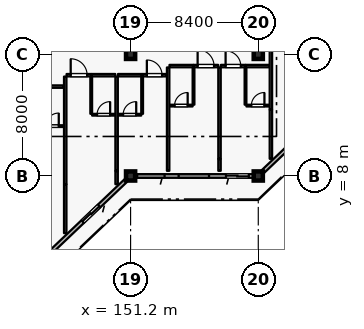
"""IFC4 building model, lengths in metres.
Left out: names, types, materials, properties, quantities, classifications, styles, units other than length and angle.
Written with IfcOpenShell. Run it as: python <this file> out.ifc"""

import sys

from ifc_helpers import new_model, si_unit, direction, frame, frame_2d, origin, origin_2d, place, context, subcontext, project, spatial, rectangle, extrude, element, fill, save


model = new_model("IFC4")
c1 = context("Model", 3, precision=1e-05, world=origin(), true_north=direction((0.0, 1.0)))
c2 = subcontext(c1, "Body", "Model", "MODEL_VIEW")
j1 = project(units=[si_unit("LENGTHUNIT", "METRE"), si_unit("PLANEANGLEUNIT", "RADIAN")], contexts=[c1])
p1 = place(None, origin())
s1 = spatial("IfcSite", under=j1, at=p1, CompositionType="ELEMENT")
p2 = place(p1, origin())
s2 = spatial("IfcBuilding", under=s1, at=p2, CompositionType="ELEMENT")
p3 = place(p2, frame((0.0, 0.0, 43.2)))
s3 = spatial("IfcBuildingStorey", under=s2, at=p3, CompositionType="ELEMENT", Elevation=43.2)
for number, where, z_axis, x_axis in (
    (1, (151.2, 8.0, 0.0), (0.0, 0.0, 1.0), (1.0, 0.0, 0.0)),
    (2, (159.6, 8.0, 0.0), (0.0, 0.0, 1.0), (1.0, 0.0, 0.0)),
    (3, (151.2, 16.0, 0.0), (0.0, 0.0, 1.0), (1.0, 0.0, 0.0)),
    (4, (159.6, 16.0, 0.0), (0.0, 0.0, 1.0), (1.0, 0.0, 0.0)),
):
    element("IfcColumn", number, at=place(p3, frame(where, z_axis=z_axis, x_axis=x_axis)), inside=s3, PredefinedType="COLUMN", context=c2, shape_type="SweptSolid", body=[
        extrude(rectangle(XDim=0.6, YDim=0.6, at=origin_2d()), origin(), (0.0, 0.0, 1.0), 4.2),
    ])
p4 = place(p3, frame((150.9, 7.714, 0.0), z_axis=(0.0, 0.0, 1.0), x_axis=(-0.724145477467, -0.689647248573, 0.0)))
e5 = element("IfcWall", 5, at=p4, inside=s3, PredefinedType="SOLIDWALL", context=c2, shape_type="SweptSolid", body=[
    extrude(rectangle(XDim=10.771, YDim=0.24, at=frame_2d((5.385, 0.0))), origin(), (0.0, 0.0, 1.0), 3.54),
])
p5 = place(p4, frame((2.44, 0.0, 0.0)))
e6 = element("IfcOpeningElement", 6, at=p5, cuts=e5, PredefinedType="OPENING", context=c2, shape_type="SweptSolid", body=[
    extrude(rectangle(XDim=1.5, YDim=2.25, at=frame_2d((0.75, 1.125))), frame((0.0, 0.13, 0.0), z_axis=(0.0, -1.0, 0.0), x_axis=(1.0, 0.0, 0.0)), (0.0, 0.0, 1.0), 0.26),
])
p6 = place(p4, frame((6.857, 0.0, 0.8)))
e7 = element("IfcOpeningElement", 7, at=p6, cuts=e5, PredefinedType="OPENING", context=c2, shape_type="SweptSolid", body=[
    extrude(rectangle(XDim=2.0, YDim=1.75, at=frame_2d((1.0, 0.875))), frame((0.0, 0.13, 0.0), z_axis=(0.0, -1.0, 0.0), x_axis=(1.0, 0.0, 0.0)), (0.0, 0.0, 1.0), 0.26),
])
p7 = place(p3, frame((159.3, 8.0, 0.0), z_axis=(0.0, 0.0, 1.0), x_axis=(-1.0, 0.0, 0.0)))
e8 = element("IfcWall", 8, at=p7, inside=s3, PredefinedType="SOLIDWALL", context=c2, shape_type="SweptSolid", body=[
    extrude(rectangle(XDim=7.8, YDim=0.24, at=frame_2d((3.9, 0.0))), origin(), (0.0, 0.0, 1.0), 3.49),
])
p8 = place(p7, frame((0.325, 0.0, 0.0)))
e9 = element("IfcOpeningElement", 9, at=p8, cuts=e8, PredefinedType="OPENING", context=c2, shape_type="SweptSolid", body=[
    extrude(rectangle(XDim=1.5, YDim=2.25, at=frame_2d((0.75, 1.125))), frame((0.0, 0.13, 0.0), z_axis=(0.0, -1.0, 0.0), x_axis=(1.0, 0.0, 0.0)), (0.0, 0.0, 1.0), 0.26),
])
p9 = place(p7, frame((2.94, 0.0, 0.8)))
e10 = element("IfcOpeningElement", 10, at=p9, cuts=e8, PredefinedType="OPENING", context=c2, shape_type="SweptSolid", body=[
    extrude(rectangle(XDim=2.0, YDim=1.75, at=frame_2d((1.0, 0.875))), frame((0.0, 0.13, 0.0), z_axis=(0.0, -1.0, 0.0), x_axis=(1.0, 0.0, 0.0)), (0.0, 0.0, 1.0), 0.26),
])
p10 = place(p7, frame((5.865, 0.0, 0.8)))
e11 = element("IfcOpeningElement", 11, at=p10, cuts=e8, PredefinedType="OPENING", context=c2, shape_type="SweptSolid", body=[
    extrude(rectangle(XDim=1.8, YDim=1.7, at=frame_2d((0.9, 0.85))), frame((0.0, 0.13, 0.0), z_axis=(0.0, -1.0, 0.0), x_axis=(1.0, 0.0, 0.0)), (0.0, 0.0, 1.0), 0.26),
])
p11 = place(p3, frame((167.7, 15.714, 0.0), z_axis=(0.0, 0.0, 1.0), x_axis=(-0.724156257633, -0.689635928973, 0.0)))
e12 = element("IfcWall", 12, at=p11, inside=s3, PredefinedType="SOLIDWALL", context=c2, shape_type="SweptSolid", body=[
    extrude(rectangle(XDim=10.771, YDim=0.24, at=frame_2d((5.386, 0.0))), origin(), (0.0, 0.0, 1.0), 3.49),
])
p12 = place(p11, frame((2.274, 0.0, 0.0)))
e13 = element("IfcOpeningElement", 13, at=p12, cuts=e12, PredefinedType="OPENING", context=c2, shape_type="SweptSolid", body=[
    extrude(rectangle(XDim=1.5, YDim=2.25, at=frame_2d((0.75, 1.125))), frame((0.0, 0.13, 0.0), z_axis=(0.0, -1.0, 0.0), x_axis=(1.0, 0.0, 0.0)), (0.0, 0.0, 1.0), 0.26),
])
p13 = place(p11, frame((6.699, 0.0, 0.8)))
e14 = element("IfcOpeningElement", 14, at=p13, cuts=e12, PredefinedType="OPENING", context=c2, shape_type="SweptSolid", body=[
    extrude(rectangle(XDim=2.0, YDim=1.75, at=frame_2d((1.0, 0.875))), frame((0.0, 0.13, 0.0), z_axis=(0.0, -1.0, 0.0), x_axis=(1.0, 0.0, 0.0)), (0.0, 0.0, 1.0), 0.26),
])
p14 = place(p3, frame((145.24, 13.88, 0.0), z_axis=(0.0, 0.0, 1.0), x_axis=(1.0, 0.0, 0.0)))
e15 = element("IfcWall", 15, at=p14, inside=s3, PredefinedType="PARTITIONING", context=c2, shape_type="SweptSolid", body=[
    extrude(rectangle(XDim=1.57, YDim=0.16, at=frame_2d((0.785, 0.0))), origin(), (0.0, 0.0, 1.0), 3.935),
])
p15 = place(p3, frame((145.29, 11.28, 0.0), z_axis=(0.0, 0.0, 1.0), x_axis=(1.0, 0.0, 0.0)))
e16 = element("IfcWall", 16, at=p15, inside=s3, PredefinedType="PARTITIONING", context=c2, shape_type="SweptSolid", body=[
    extrude(rectangle(XDim=1.51, YDim=0.115, at=frame_2d((0.755, 0.0))), origin(), (0.0, 0.0, 1.0), 3.935),
])
p16 = place(p15, frame((0.325, 0.0, 0.0)))
e17 = element("IfcOpeningElement", 17, at=p16, cuts=e16, PredefinedType="OPENING", context=c2, shape_type="SweptSolid", body=[
    extrude(rectangle(XDim=0.86, YDim=2.12, at=frame_2d((0.43, 1.06))), frame((0.0, 0.067, 0.0), z_axis=(0.0, -1.0, 0.0), x_axis=(1.0, 0.0, 0.0)), (0.0, 0.0, 1.0), 0.135),
])
p17 = place(p3, frame((146.9, 4.24, 0.0), z_axis=(0.0, 0.0, 1.0), x_axis=(0.0, 1.0, 0.0)))
e18 = element("IfcWall", 18, at=p17, inside=s3, PredefinedType="PARTITIONING", context=c2, shape_type="SweptSolid", body=[
    extrude(rectangle(XDim=3.21, YDim=0.16, at=frame_2d((1.605, 0.0))), origin(), (0.0, 0.0, 1.0), 3.935),
])
p18 = place(p3, frame((146.99, 14.63, 0.0), z_axis=(0.0, 0.0, 1.0), x_axis=(1.0, 0.0, 0.0)))
e19 = element("IfcWall", 19, at=p18, inside=s3, PredefinedType="PARTITIONING", context=c2, shape_type="SweptSolid", body=[
    extrude(rectangle(XDim=1.62, YDim=0.16, at=frame_2d((0.81, 0.0))), origin(), (0.0, 0.0, 1.0), 3.935),
])
p19 = place(p18, frame((0.27, 0.0, 0.0)))
e20 = element("IfcOpeningElement", 20, at=p19, cuts=e19, PredefinedType="OPENING", context=c2, shape_type="SweptSolid", body=[
    extrude(rectangle(XDim=1.08, YDim=2.3, at=frame_2d((0.54, 1.15))), frame((0.0, 0.09, 0.0), z_axis=(0.0, -1.0, 0.0), x_axis=(1.0, 0.0, 0.0)), (0.0, 0.0, 1.0), 0.18),
])
p20 = place(p3, frame((148.62, 14.63, 0.0), z_axis=(0.0, 0.0, 1.0), x_axis=(1.0, 0.0, 0.0)))
e21 = element("IfcWall", 21, at=p20, inside=s3, PredefinedType="PARTITIONING", context=c2, shape_type="SweptSolid", body=[
    extrude(rectangle(XDim=1.57, YDim=0.16, at=frame_2d((0.785, 0.0))), origin(), (0.0, 0.0, 1.0), 3.935),
])
p21 = place(p3, frame((148.61, 12.09, 0.0), z_axis=(0.0, 0.0, 1.0), x_axis=(0.0, 1.0, 0.0)))
e22 = element("IfcWall", 22, at=p21, inside=s3, PredefinedType="PARTITIONING", context=c2, shape_type="SweptSolid", body=[
    extrude(rectangle(XDim=2.45, YDim=0.115, at=frame_2d((1.225, 0.0))), origin(), (0.0, 0.0, 1.0), 3.935),
])
p22 = place(p3, frame((148.67, 12.03, 0.0), z_axis=(0.0, 0.0, 1.0), x_axis=(1.0, 0.0, 0.0)))
e23 = element("IfcWall", 23, at=p22, inside=s3, PredefinedType="PARTITIONING", context=c2, shape_type="SweptSolid", body=[
    extrude(rectangle(XDim=1.51, YDim=0.115, at=frame_2d((0.755, 0.0))), origin(), (0.0, 0.0, 1.0), 3.935),
])
p23 = place(p22, frame((0.325, 0.0, 0.0)))
e24 = element("IfcOpeningElement", 24, at=p23, cuts=e23, PredefinedType="OPENING", context=c2, shape_type="SweptSolid", body=[
    extrude(rectangle(XDim=0.86, YDim=2.12, at=frame_2d((0.43, 1.06))), frame((0.0, 0.067, 0.0), z_axis=(0.0, -1.0, 0.0), x_axis=(1.0, 0.0, 0.0)), (0.0, 0.0, 1.0), 0.135),
])
p24 = place(p3, frame((146.9, 7.46, 0.0), z_axis=(0.0, 0.0, 1.0), x_axis=(0.0, 1.0, 0.0)))
e25 = element("IfcWall", 25, at=p24, inside=s3, PredefinedType="PARTITIONING", context=c2, shape_type="SweptSolid", body=[
    extrude(rectangle(XDim=7.08, YDim=0.16, at=frame_2d((3.54, 0.0))), origin(), (0.0, 0.0, 1.0), 3.935),
])
p25 = place(p3, frame((150.28, 7.46, 0.0), z_axis=(0.0, 0.0, 1.0), x_axis=(0.0, 1.0, 0.0)))
e26 = element("IfcWall", 26, at=p25, inside=s3, PredefinedType="PARTITIONING", context=c2, shape_type="SweptSolid", body=[
    extrude(rectangle(XDim=0.87, YDim=0.16, at=frame_2d((0.435, 0.0))), origin(), (0.0, 0.0, 1.0), 3.935),
])
p26 = place(p3, frame((150.37, 14.63, 0.0), z_axis=(0.0, 0.0, 1.0), x_axis=(1.0, 0.0, 0.0)))
e27 = element("IfcWall", 27, at=p26, inside=s3, PredefinedType="PARTITIONING", context=c2, shape_type="SweptSolid", body=[
    extrude(rectangle(XDim=1.58, YDim=0.16, at=frame_2d((0.79, 0.0))), origin(), (0.0, 0.0, 1.0), 3.935),
])
p27 = place(p3, frame((151.96, 14.63, 0.0), z_axis=(0.0, 0.0, 1.0), x_axis=(1.0, 0.0, 0.0)))
e28 = element("IfcWall", 28, at=p27, inside=s3, PredefinedType="PARTITIONING", context=c2, shape_type="SweptSolid", body=[
    extrude(rectangle(XDim=1.62, YDim=0.16, at=frame_2d((0.81, 0.0))), origin(), (0.0, 0.0, 1.0), 3.935),
])
p28 = place(p27, frame((0.31, 0.0, 0.0)))
e29 = element("IfcOpeningElement", 29, at=p28, cuts=e28, PredefinedType="OPENING", context=c2, shape_type="SweptSolid", body=[
    extrude(rectangle(XDim=1.0, YDim=2.25, at=frame_2d((0.5, 1.125))), frame((0.0, 0.09, 0.0), z_axis=(0.0, -1.0, 0.0), x_axis=(1.0, 0.0, 0.0)), (0.0, 0.0, 1.0), 0.18),
])
p29 = place(p3, frame((151.96, 12.09, 0.0), z_axis=(0.0, 0.0, 1.0), x_axis=(0.0, 1.0, 0.0)))
e30 = element("IfcWall", 30, at=p29, inside=s3, PredefinedType="PARTITIONING", context=c2, shape_type="SweptSolid", body=[
    extrude(rectangle(XDim=2.45, YDim=0.115, at=frame_2d((1.225, 0.0))), origin(), (0.0, 0.0, 1.0), 3.935),
])
p30 = place(p3, frame((150.38, 12.03, 0.0), z_axis=(0.0, 0.0, 1.0), x_axis=(1.0, 0.0, 0.0)))
e31 = element("IfcWall", 31, at=p30, inside=s3, PredefinedType="PARTITIONING", context=c2, shape_type="SweptSolid", body=[
    extrude(rectangle(XDim=1.52, YDim=0.115, at=frame_2d((0.76, 0.0))), origin(), (0.0, 0.0, 1.0), 3.935),
])
p31 = place(p30, frame((0.33, 0.0, 0.0)))
e32 = element("IfcOpeningElement", 32, at=p31, cuts=e31, PredefinedType="OPENING", context=c2, shape_type="SweptSolid", body=[
    extrude(rectangle(XDim=0.86, YDim=2.12, at=frame_2d((0.43, 1.06))), frame((0.0, 0.067, 0.0), z_axis=(0.0, -1.0, 0.0), x_axis=(1.0, 0.0, 0.0)), (0.0, 0.0, 1.0), 0.135),
])
p32 = place(p3, frame((150.28, 8.34, 0.0), z_axis=(0.0, 0.0, 1.0), x_axis=(0.0, 1.0, 0.0)))
e33 = element("IfcWall", 33, at=p32, inside=s3, PredefinedType="PARTITIONING", context=c2, shape_type="SweptSolid", body=[
    extrude(rectangle(XDim=6.2, YDim=0.16, at=frame_2d((3.1, 0.0))), origin(), (0.0, 0.0, 1.0), 3.935),
])
p33 = place(p3, frame((153.76, 15.23, 0.0), z_axis=(0.0, 0.0, 1.0), x_axis=(1.0, 0.0, 0.0)))
e34 = element("IfcWall", 34, at=p33, inside=s3, PredefinedType="PARTITIONING", context=c2, shape_type="SweptSolid", body=[
    extrude(rectangle(XDim=1.57, YDim=0.16, at=frame_2d((0.785, 0.0))), origin(), (0.0, 0.0, 1.0), 3.935),
])
p34 = place(p3, frame((155.34, 15.23, 0.0), z_axis=(0.0, 0.0, 1.0), x_axis=(1.0, 0.0, 0.0)))
e35 = element("IfcWall", 35, at=p34, inside=s3, PredefinedType="PARTITIONING", context=c2, shape_type="SweptSolid", body=[
    extrude(rectangle(XDim=1.62, YDim=0.16, at=frame_2d((0.81, 0.0))), origin(), (0.0, 0.0, 1.0), 3.935),
])
p35 = place(p34, frame((0.27, 0.0, 0.0)))
e36 = element("IfcOpeningElement", 36, at=p35, cuts=e35, PredefinedType="OPENING", context=c2, shape_type="SweptSolid", body=[
    extrude(rectangle(XDim=1.08, YDim=2.3, at=frame_2d((0.54, 1.15))), frame((0.0, 0.09, 0.0), z_axis=(0.0, -1.0, 0.0), x_axis=(1.0, 0.0, 0.0)), (0.0, 0.0, 1.0), 0.18),
])
p36 = place(p3, frame((155.34, 12.69, 0.0), z_axis=(0.0, 0.0, 1.0), x_axis=(0.0, 1.0, 0.0)))
e37 = element("IfcWall", 37, at=p36, inside=s3, PredefinedType="PARTITIONING", context=c2, shape_type="SweptSolid", body=[
    extrude(rectangle(XDim=2.45, YDim=0.115, at=frame_2d((1.225, 0.0))), origin(), (0.0, 0.0, 1.0), 3.935),
])
p37 = place(p3, frame((153.77, 12.63, 0.0), z_axis=(0.0, 0.0, 1.0), x_axis=(1.0, 0.0, 0.0)))
e38 = element("IfcWall", 38, at=p37, inside=s3, PredefinedType="PARTITIONING", context=c2, shape_type="SweptSolid", body=[
    extrude(rectangle(XDim=1.51, YDim=0.115, at=frame_2d((0.755, 0.0))), origin(), (0.0, 0.0, 1.0), 3.935),
])
p38 = place(p37, frame((0.325, 0.0, 0.0)))
e39 = element("IfcOpeningElement", 39, at=p38, cuts=e38, PredefinedType="OPENING", context=c2, shape_type="SweptSolid", body=[
    extrude(rectangle(XDim=0.86, YDim=2.12, at=frame_2d((0.43, 1.06))), frame((0.0, 0.067, 0.0), z_axis=(0.0, -1.0, 0.0), x_axis=(1.0, 0.0, 0.0)), (0.0, 0.0, 1.0), 0.135),
])
p39 = place(p3, frame((153.67, 8.34, 0.0), z_axis=(0.0, 0.0, 1.0), x_axis=(0.0, 1.0, 0.0)))
e40 = element("IfcWall", 40, at=p39, inside=s3, PredefinedType="PARTITIONING", context=c2, shape_type="SweptSolid", body=[
    extrude(rectangle(XDim=6.8, YDim=0.16, at=frame_2d((3.4, 0.0))), origin(), (0.0, 0.0, 1.0), 3.935),
])
p40 = place(p3, frame((157.05, 8.34, 0.0), z_axis=(0.0, 0.0, 1.0), x_axis=(0.0, 1.0, 0.0)))
e41 = element("IfcWall", 41, at=p40, inside=s3, PredefinedType="PARTITIONING", context=c2, shape_type="SweptSolid", body=[
    extrude(rectangle(XDim=0.78, YDim=0.16, at=frame_2d((0.39, 0.0))), origin(), (0.0, 0.0, 1.0), 3.935),
])
p41 = place(p3, frame((157.14, 15.23, 0.0), z_axis=(0.0, 0.0, 1.0), x_axis=(1.0, 0.0, 0.0)))
e42 = element("IfcWall", 42, at=p41, inside=s3, PredefinedType="PARTITIONING", context=c2, shape_type="SweptSolid", body=[
    extrude(rectangle(XDim=1.62, YDim=0.16, at=frame_2d((0.81, 0.0))), origin(), (0.0, 0.0, 1.0), 3.935),
])
p42 = place(p41, frame((0.31, 0.0, 0.0)))
e43 = element("IfcOpeningElement", 43, at=p42, cuts=e42, PredefinedType="OPENING", context=c2, shape_type="SweptSolid", body=[
    extrude(rectangle(XDim=1.0, YDim=2.25, at=frame_2d((0.5, 1.125))), frame((0.0, 0.09, 0.0), z_axis=(0.0, -1.0, 0.0), x_axis=(1.0, 0.0, 0.0)), (0.0, 0.0, 1.0), 0.18),
])
p43 = place(p3, frame((158.77, 15.23, 0.0), z_axis=(0.0, 0.0, 1.0), x_axis=(1.0, 0.0, 0.0)))
e44 = element("IfcWall", 44, at=p43, inside=s3, PredefinedType="PARTITIONING", context=c2, shape_type="SweptSolid", body=[
    extrude(rectangle(XDim=1.57, YDim=0.16, at=frame_2d((0.785, 0.0))), origin(), (0.0, 0.0, 1.0), 3.935),
])
p44 = place(p3, frame((158.76, 12.69, 0.0), z_axis=(0.0, 0.0, 1.0), x_axis=(0.0, 1.0, 0.0)))
e45 = element("IfcWall", 45, at=p44, inside=s3, PredefinedType="PARTITIONING", context=c2, shape_type="SweptSolid", body=[
    extrude(rectangle(XDim=2.45, YDim=0.115, at=frame_2d((1.225, 0.0))), origin(), (0.0, 0.0, 1.0), 3.935),
])
p45 = place(p3, frame((158.82, 12.63, 0.0), z_axis=(0.0, 0.0, 1.0), x_axis=(1.0, 0.0, 0.0)))
e46 = element("IfcWall", 46, at=p45, inside=s3, PredefinedType="PARTITIONING", context=c2, shape_type="SweptSolid", body=[
    extrude(rectangle(XDim=1.51, YDim=0.115, at=frame_2d((0.755, 0.0))), origin(), (0.0, 0.0, 1.0), 3.935),
])
p46 = place(p45, frame((0.325, 0.0, 0.0)))
e47 = element("IfcOpeningElement", 47, at=p46, cuts=e46, PredefinedType="OPENING", context=c2, shape_type="SweptSolid", body=[
    extrude(rectangle(XDim=0.86, YDim=2.12, at=frame_2d((0.43, 1.06))), frame((0.0, 0.067, 0.0), z_axis=(0.0, -1.0, 0.0), x_axis=(1.0, 0.0, 0.0)), (0.0, 0.0, 1.0), 0.135),
])
p47 = place(p3, frame((157.05, 9.13, 0.0), z_axis=(0.0, 0.0, 1.0), x_axis=(0.0, 1.0, 0.0)))
e48 = element("IfcWall", 48, at=p47, inside=s3, PredefinedType="PARTITIONING", context=c2, shape_type="SweptSolid", body=[
    extrude(rectangle(XDim=6.01, YDim=0.16, at=frame_2d((3.005, 0.0))), origin(), (0.0, 0.0, 1.0), 3.935),
])
p48 = place(p3, frame((160.43, 9.13, 0.0), z_axis=(0.0, 0.0, 1.0), x_axis=(0.0, 1.0, 0.0)))
e49 = element("IfcWall", 49, at=p48, inside=s3, PredefinedType="PARTITIONING", context=c2, shape_type="SweptSolid", body=[
    extrude(rectangle(XDim=3.22, YDim=0.16, at=frame_2d((1.61, 0.0))), origin(), (0.0, 0.0, 1.0), 3.935),
])
p49 = place(p3, frame((160.43, 12.36, 0.0), z_axis=(0.0, 0.0, 1.0), x_axis=(0.0, 1.0, 0.0)))
e50 = element("IfcWall", 50, at=p49, inside=s3, PredefinedType="PARTITIONING", context=c2, shape_type="SweptSolid", body=[
    extrude(rectangle(XDim=9.55, YDim=0.16, at=frame_2d((4.775, 0.0))), origin(), (0.0, 0.0, 1.0), 3.935),
])
p50 = place(p5, origin())
e51 = element("IfcDoor", 51, at=p50, inside=s3, OperationType="SLIDING_TO_LEFT", PredefinedType="DOOR", context=c2, shape_type="SweptSolid", body=[
    extrude(rectangle(XDim=1.5, YDim=2.25, at=frame_2d((0.75, 1.125))), frame((0.0, 0.025, 0.0), z_axis=(0.0, -1.0, 0.0), x_axis=(1.0, 0.0, 0.0)), (0.0, 0.0, 1.0), 0.05),
])
fill(e6, e51)
p51 = place(p8, origin())
e52 = element("IfcDoor", 52, at=p51, inside=s3, OperationType="SLIDING_TO_LEFT", PredefinedType="DOOR", context=c2, shape_type="SweptSolid", body=[
    extrude(rectangle(XDim=1.5, YDim=2.25, at=frame_2d((0.75, 1.125))), frame((0.0, 0.025, 0.0), z_axis=(0.0, -1.0, 0.0), x_axis=(1.0, 0.0, 0.0)), (0.0, 0.0, 1.0), 0.05),
])
fill(e9, e52)
p52 = place(p9, origin())
e53 = element("IfcWindow", 53, at=p52, inside=s3, PartitioningType="DOUBLE_PANEL_VERTICAL", PredefinedType="WINDOW", context=c2, shape_type="SweptSolid", body=[
    extrude(rectangle(XDim=2.0, YDim=1.75, at=frame_2d((1.0, 0.875))), frame((0.0, 0.03, 0.0), z_axis=(0.0, -1.0, 0.0), x_axis=(1.0, 0.0, 0.0)), (0.0, 0.0, 1.0), 0.06),
])
fill(e10, e53)
p53 = place(p10, origin())
e54 = element("IfcWindow", 54, at=p53, inside=s3, PartitioningType="DOUBLE_PANEL_VERTICAL", PredefinedType="WINDOW", context=c2, shape_type="SweptSolid", body=[
    extrude(rectangle(XDim=1.8, YDim=1.7, at=frame_2d((0.9, 0.85))), frame((0.0, 0.03, 0.0), z_axis=(0.0, -1.0, 0.0), x_axis=(1.0, 0.0, 0.0)), (0.0, 0.0, 1.0), 0.06),
])
fill(e11, e54)
p54 = place(p16, origin())
e55 = element("IfcDoor", 55, at=p54, inside=s3, OperationType="SINGLE_SWING_RIGHT", PredefinedType="DOOR", context=c2, shape_type="SweptSolid", body=[
    extrude(rectangle(XDim=0.86, YDim=2.12, at=frame_2d((0.43, 1.06))), frame((0.0, 0.025, 0.0), z_axis=(0.0, -1.0, 0.0), x_axis=(1.0, 0.0, 0.0)), (0.0, 0.0, 1.0), 0.05),
])
fill(e17, e55)
p55 = place(p19, origin())
e56 = element("IfcDoor", 56, at=p55, inside=s3, OperationType="SINGLE_SWING_LEFT", PredefinedType="DOOR", context=c2, shape_type="SweptSolid", body=[
    extrude(rectangle(XDim=1.08, YDim=2.3, at=frame_2d((0.54, 1.15))), frame((0.0, 0.025, 0.0), z_axis=(0.0, -1.0, 0.0), x_axis=(1.0, 0.0, 0.0)), (0.0, 0.0, 1.0), 0.05),
])
fill(e20, e56)
p56 = place(p23, origin())
e57 = element("IfcDoor", 57, at=p56, inside=s3, OperationType="SINGLE_SWING_RIGHT", PredefinedType="DOOR", context=c2, shape_type="SweptSolid", body=[
    extrude(rectangle(XDim=0.86, YDim=2.12, at=frame_2d((0.43, 1.06))), frame((0.0, 0.025, 0.0), z_axis=(0.0, -1.0, 0.0), x_axis=(1.0, 0.0, 0.0)), (0.0, 0.0, 1.0), 0.05),
])
fill(e24, e57)
p57 = place(p28, origin())
e58 = element("IfcDoor", 58, at=p57, inside=s3, OperationType="SINGLE_SWING_LEFT", PredefinedType="DOOR", context=c2, shape_type="SweptSolid", body=[
    extrude(rectangle(XDim=1.0, YDim=2.25, at=frame_2d((0.5, 1.125))), frame((0.0, 0.025, 0.0), z_axis=(0.0, -1.0, 0.0), x_axis=(1.0, 0.0, 0.0)), (0.0, 0.0, 1.0), 0.05),
])
fill(e29, e58)
p58 = place(p31, origin())
e59 = element("IfcDoor", 59, at=p58, inside=s3, OperationType="SINGLE_SWING_RIGHT", PredefinedType="DOOR", context=c2, shape_type="SweptSolid", body=[
    extrude(rectangle(XDim=0.86, YDim=2.12, at=frame_2d((0.43, 1.06))), frame((0.0, 0.025, 0.0), z_axis=(0.0, -1.0, 0.0), x_axis=(1.0, 0.0, 0.0)), (0.0, 0.0, 1.0), 0.05),
])
fill(e32, e59)
p59 = place(p35, origin())
e60 = element("IfcDoor", 60, at=p59, inside=s3, OperationType="SINGLE_SWING_LEFT", PredefinedType="DOOR", context=c2, shape_type="SweptSolid", body=[
    extrude(rectangle(XDim=1.08, YDim=2.3, at=frame_2d((0.54, 1.15))), frame((0.0, 0.025, 0.0), z_axis=(0.0, -1.0, 0.0), x_axis=(1.0, 0.0, 0.0)), (0.0, 0.0, 1.0), 0.05),
])
fill(e36, e60)
p60 = place(p38, origin())
e61 = element("IfcDoor", 61, at=p60, inside=s3, OperationType="SINGLE_SWING_RIGHT", PredefinedType="DOOR", context=c2, shape_type="SweptSolid", body=[
    extrude(rectangle(XDim=0.86, YDim=2.12, at=frame_2d((0.43, 1.06))), frame((0.0, 0.025, 0.0), z_axis=(0.0, -1.0, 0.0), x_axis=(1.0, 0.0, 0.0)), (0.0, 0.0, 1.0), 0.05),
])
fill(e39, e61)
p61 = place(p42, origin())
e62 = element("IfcDoor", 62, at=p61, inside=s3, OperationType="SINGLE_SWING_LEFT", PredefinedType="DOOR", context=c2, shape_type="SweptSolid", body=[
    extrude(rectangle(XDim=1.0, YDim=2.25, at=frame_2d((0.5, 1.125))), frame((0.0, 0.025, 0.0), z_axis=(0.0, -1.0, 0.0), x_axis=(1.0, 0.0, 0.0)), (0.0, 0.0, 1.0), 0.05),
])
fill(e43, e62)
p62 = place(p46, origin())
e63 = element("IfcDoor", 63, at=p62, inside=s3, OperationType="SINGLE_SWING_RIGHT", PredefinedType="DOOR", context=c2, shape_type="SweptSolid", body=[
    extrude(rectangle(XDim=0.86, YDim=2.12, at=frame_2d((0.43, 1.06))), frame((0.0, 0.025, 0.0), z_axis=(0.0, -1.0, 0.0), x_axis=(1.0, 0.0, 0.0)), (0.0, 0.0, 1.0), 0.05),
])
fill(e47, e63)
save(model, sys.argv[1])
